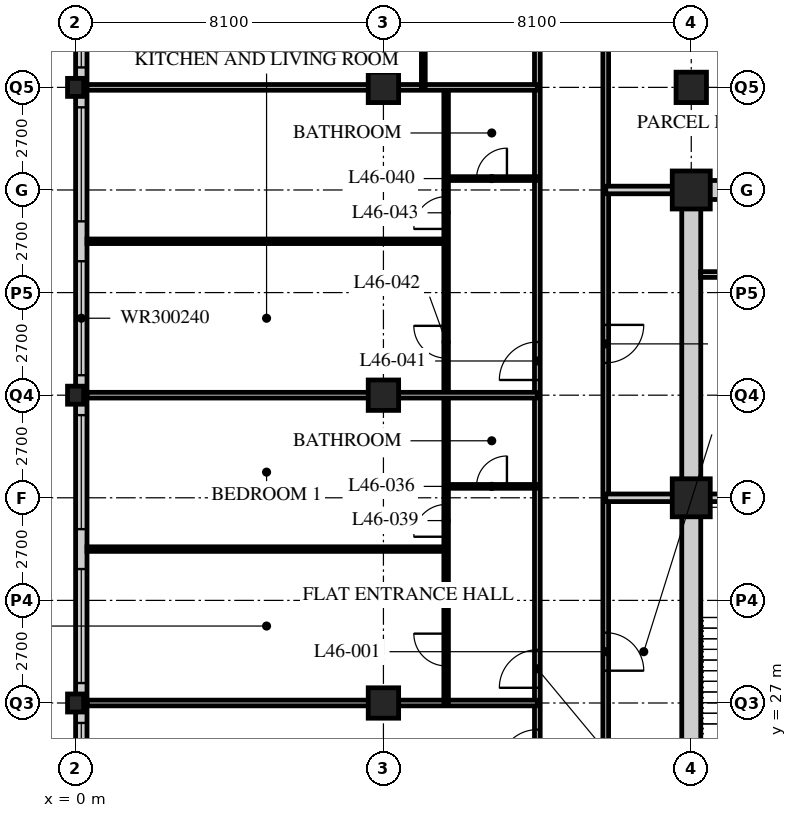
"""IFC4 building model, lengths in metres.
Left out: names, types, materials, properties, quantities, classifications, styles, units other than length and angle.
Written with IfcOpenShell. Run it as: python <this file> out.ifc"""

import sys

from ifc_helpers import new_model, si_unit, direction, frame, frame_2d, origin, origin_2d, place, context, subcontext, project, spatial, rectangle, hollow_rectangle, i_section, extrude, element, fill, save


model = new_model("IFC4")
c1 = context("Model", 3, precision=1e-05, world=origin(), true_north=direction((0.0, 1.0)))
c2 = subcontext(c1, "Body", "Model", "MODEL_VIEW")
j1 = project(units=[si_unit("LENGTHUNIT", "METRE"), si_unit("PLANEANGLEUNIT", "RADIAN")], contexts=[c1])
p1 = place(None, origin())
s1 = spatial("IfcSite", under=j1, at=p1, CompositionType="ELEMENT")
p2 = place(p1, origin())
s2 = spatial("IfcBuilding", under=s1, at=p2, CompositionType="ELEMENT")
p3 = place(p2, frame((0.0, 0.0, 181.2)))
s3 = spatial("IfcBuildingStorey", under=s2, at=p3, CompositionType="ELEMENT", Elevation=181.2)
for number, where, z_axis, x_axis in (
    (1, (0.0, 27.0, 0.0), (0.0, 0.0, 1.0), (1.0, 0.0, 0.0)),
    (2, (0.0, 35.1, 0.0), (0.0, 0.0, 1.0), (1.0, 0.0, 0.0)),
    (3, (0.0, 43.2, 0.0), (0.0, 0.0, 1.0), (1.0, 0.0, 0.0)),
):
    element("IfcColumn", number, at=place(p3, frame(where, z_axis=z_axis, x_axis=x_axis)), inside=s3, PredefinedType="COLUMN", context=c2, shape_type="SweptSolid", body=[
        extrude(i_section(OverallWidth=0.424, OverallDepth=0.475, WebThickness=0.048, FlangeThickness=0.077, FilletRadius=0.015, at=origin_2d()), origin(), (0.0, 0.0, 1.0), 3.6),
    ])
for number, where, z_axis, x_axis in (
    (4, (8.1, 27.0, 0.0), (0.0, 0.0, 1.0), (1.0, 0.0, 0.0)),
    (5, (8.1, 35.1, 0.0), (0.0, 0.0, 1.0), (1.0, 0.0, 0.0)),
    (6, (8.1, 43.2, 0.0), (0.0, 0.0, 1.0), (1.0, 0.0, 0.0)),
):
    element("IfcColumn", number, at=place(p3, frame(where, z_axis=z_axis, x_axis=x_axis)), inside=s3, PredefinedType="COLUMN", context=c2, shape_type="SweptSolid", body=[
        extrude(hollow_rectangle(XDim=0.8, YDim=0.8, WallThickness=0.08, at=origin_2d()), origin(), (0.0, 0.0, 1.0), 3.6),
    ])
for number, where, z_axis, x_axis in (
    (7, (16.2, 32.4, 0.0), (0.0, 0.0, 1.0), (1.0, 0.0, 0.0)),
    (8, (16.2, 40.5, 0.0), (0.0, 0.0, 1.0), (1.0, 0.0, 0.0)),
):
    element("IfcColumn", number, at=place(p3, frame(where, z_axis=z_axis, x_axis=x_axis)), inside=s3, PredefinedType="COLUMN", context=c2, shape_type="SweptSolid", body=[
        extrude(hollow_rectangle(XDim=1.0, YDim=1.0, WallThickness=0.1, at=origin_2d()), origin(), (0.0, 0.0, 1.0), 3.6),
    ])
p4 = place(p3, frame((16.2, 43.2, 0.0), z_axis=(0.0, 0.0, 1.0), x_axis=(1.0, 0.0, 0.0)))
e9 = element("IfcColumn", 9, at=p4, inside=s3, PredefinedType="COLUMN", context=c2, shape_type="SweptSolid", body=[
    extrude(hollow_rectangle(XDim=0.8, YDim=0.8, WallThickness=0.08, at=origin_2d()), origin(), (0.0, 0.0, 1.0), 3.6),
])
p5 = place(p3, frame((0.15, 51.0, 0.0), z_axis=(0.0, 0.0, 1.0), x_axis=(0.0, -1.0, 0.0)))
e10 = element("IfcWall", 10, at=p5, inside=s3, PredefinedType="SOLIDWALL", context=c2, shape_type="SweptSolid", body=[
    extrude(rectangle(XDim=32.1, YDim=0.3, at=frame_2d((16.05, 0.0))), origin(), (0.0, 0.0, 1.0), 3.39),
])
p6 = place(p5, frame((0.225, 0.0, 0.6)))
e11 = element("IfcOpeningElement", 11, at=p6, cuts=e10, PredefinedType="OPENING", context=c2, shape_type="SweptSolid", body=[
    extrude(rectangle(XDim=3.0, YDim=2.4, at=frame_2d((1.5, 1.2))), frame((0.0, 0.16, 0.0), z_axis=(0.0, -1.0, 0.0), x_axis=(1.0, 0.0, 0.0)), (0.0, 0.0, 1.0), 0.32),
])
p7 = place(p5, frame((4.275, 0.0, 0.6)))
e12 = element("IfcOpeningElement", 12, at=p7, cuts=e10, PredefinedType="OPENING", context=c2, shape_type="SweptSolid", body=[
    extrude(rectangle(XDim=3.0, YDim=2.4, at=frame_2d((1.5, 1.2))), frame((0.0, 0.16, 0.0), z_axis=(0.0, -1.0, 0.0), x_axis=(1.0, 0.0, 0.0)), (0.0, 0.0, 1.0), 0.32),
])
p8 = place(p5, frame((8.325, 0.0, 0.6)))
e13 = element("IfcOpeningElement", 13, at=p8, cuts=e10, PredefinedType="OPENING", context=c2, shape_type="SweptSolid", body=[
    extrude(rectangle(XDim=3.0, YDim=2.4, at=frame_2d((1.5, 1.2))), frame((0.0, 0.16, 0.0), z_axis=(0.0, -1.0, 0.0), x_axis=(1.0, 0.0, 0.0)), (0.0, 0.0, 1.0), 0.32),
])
p9 = place(p5, frame((12.375, 0.0, 0.6)))
e14 = element("IfcOpeningElement", 14, at=p9, cuts=e10, PredefinedType="OPENING", context=c2, shape_type="SweptSolid", body=[
    extrude(rectangle(XDim=3.0, YDim=2.4, at=frame_2d((1.5, 1.2))), frame((0.0, 0.16, 0.0), z_axis=(0.0, -1.0, 0.0), x_axis=(1.0, 0.0, 0.0)), (0.0, 0.0, 1.0), 0.32),
])
p10 = place(p5, frame((16.425, 0.0, 0.6)))
e15 = element("IfcOpeningElement", 15, at=p10, cuts=e10, PredefinedType="OPENING", context=c2, shape_type="SweptSolid", body=[
    extrude(rectangle(XDim=3.0, YDim=2.4, at=frame_2d((1.5, 1.2))), frame((0.0, 0.16, 0.0), z_axis=(0.0, -1.0, 0.0), x_axis=(1.0, 0.0, 0.0)), (0.0, 0.0, 1.0), 0.32),
])
p11 = place(p5, frame((20.475, 0.0, 0.6)))
e16 = element("IfcOpeningElement", 16, at=p11, cuts=e10, PredefinedType="OPENING", context=c2, shape_type="SweptSolid", body=[
    extrude(rectangle(XDim=3.0, YDim=2.4, at=frame_2d((1.5, 1.2))), frame((0.0, 0.16, 0.0), z_axis=(0.0, -1.0, 0.0), x_axis=(1.0, 0.0, 0.0)), (0.0, 0.0, 1.0), 0.32),
])
p12 = place(p5, frame((24.525, 0.0, 0.6)))
e17 = element("IfcOpeningElement", 17, at=p12, cuts=e10, PredefinedType="OPENING", context=c2, shape_type="SweptSolid", body=[
    extrude(rectangle(XDim=3.0, YDim=2.4, at=frame_2d((1.5, 1.2))), frame((0.0, 0.16, 0.0), z_axis=(0.0, -1.0, 0.0), x_axis=(1.0, 0.0, 0.0)), (0.0, 0.0, 1.0), 0.32),
])
p13 = place(p5, frame((28.575, 0.0, 0.6)))
e18 = element("IfcOpeningElement", 18, at=p13, cuts=e10, PredefinedType="OPENING", context=c2, shape_type="SweptSolid", body=[
    extrude(rectangle(XDim=3.0, YDim=2.4, at=frame_2d((1.5, 1.2))), frame((0.0, 0.16, 0.0), z_axis=(0.0, -1.0, 0.0), x_axis=(1.0, 0.0, 0.0)), (0.0, 0.0, 1.0), 0.32),
])
p14 = place(p3, frame((12.15, 18.9, 0.0), z_axis=(0.0, 0.0, 1.0), x_axis=(0.0, 1.0, 0.0)))
e19 = element("IfcWall", 19, at=p14, inside=s3, PredefinedType="PARTITIONING", context=c2, shape_type="SweptSolid", body=[
    extrude(rectangle(XDim=28.35, YDim=0.15, at=frame_2d((14.175, 0.0))), origin(), (0.0, 0.0, 1.0), 3.39),
])
p15 = place(p14, frame((2.35, 0.0, 0.0)))
e20 = element("IfcOpeningElement", 20, at=p15, cuts=e19, PredefinedType="OPENING", context=c2, shape_type="SweptSolid", body=[
    extrude(rectangle(XDim=1.0, YDim=2.1, at=frame_2d((0.5, 1.05))), frame((0.0, 0.085, 0.0), z_axis=(0.0, -1.0, 0.0), x_axis=(1.0, 0.0, 0.0)), (0.0, 0.0, 1.0), 0.17),
])
p16 = place(p14, frame((6.4, 0.0, 0.0)))
e21 = element("IfcOpeningElement", 21, at=p16, cuts=e19, PredefinedType="OPENING", context=c2, shape_type="SweptSolid", body=[
    extrude(rectangle(XDim=1.0, YDim=2.1, at=frame_2d((0.5, 1.05))), frame((0.0, 0.085, 0.0), z_axis=(0.0, -1.0, 0.0), x_axis=(1.0, 0.0, 0.0)), (0.0, 0.0, 1.0), 0.17),
])
p17 = place(p14, frame((8.5, 0.0, 0.0)))
e22 = element("IfcOpeningElement", 22, at=p17, cuts=e19, PredefinedType="OPENING", context=c2, shape_type="SweptSolid", body=[
    extrude(rectangle(XDim=1.0, YDim=2.1, at=frame_2d((0.5, 1.05))), frame((0.0, 0.085, 0.0), z_axis=(0.0, -1.0, 0.0), x_axis=(1.0, 0.0, 0.0)), (0.0, 0.0, 1.0), 0.17),
])
p18 = place(p14, frame((16.6, 0.0, 0.0)))
e23 = element("IfcOpeningElement", 23, at=p18, cuts=e19, PredefinedType="OPENING", context=c2, shape_type="SweptSolid", body=[
    extrude(rectangle(XDim=1.0, YDim=2.1, at=frame_2d((0.5, 1.05))), frame((0.0, 0.085, 0.0), z_axis=(0.0, -1.0, 0.0), x_axis=(1.0, 0.0, 0.0)), (0.0, 0.0, 1.0), 0.17),
])
p19 = place(p14, frame((26.65, 0.0, 0.0)))
e24 = element("IfcOpeningElement", 24, at=p19, cuts=e19, PredefinedType="OPENING", context=c2, shape_type="SweptSolid", body=[
    extrude(rectangle(XDim=1.0, YDim=2.1, at=frame_2d((0.5, 1.05))), frame((0.0, 0.085, 0.0), z_axis=(0.0, -1.0, 0.0), x_axis=(1.0, 0.0, 0.0)), (0.0, 0.0, 1.0), 0.17),
])
p20 = place(p3, frame((13.95, 45.45, 0.0), z_axis=(0.0, 0.0, 1.0), x_axis=(0.0, -1.0, 0.0)))
e25 = element("IfcWall", 25, at=p20, inside=s3, PredefinedType="PARTITIONING", context=c2, shape_type="SweptSolid", body=[
    extrude(rectangle(XDim=24.75, YDim=0.15, at=frame_2d((12.375, 0.0))), origin(), (0.0, 0.0, 1.0), 3.39),
])
p21 = place(p20, frame((16.6, 0.0, 0.0)))
e26 = element("IfcOpeningElement", 26, at=p21, cuts=e25, PredefinedType="OPENING", context=c2, shape_type="SweptSolid", body=[
    extrude(rectangle(XDim=1.0, YDim=2.1, at=frame_2d((0.5, 1.05))), frame((0.0, 0.085, 0.0), z_axis=(0.0, -1.0, 0.0), x_axis=(1.0, 0.0, 0.0)), (0.0, 0.0, 1.0), 0.17),
])
p22 = place(p20, frame((8.5, 0.0, 0.0)))
e27 = element("IfcOpeningElement", 27, at=p22, cuts=e25, PredefinedType="OPENING", context=c2, shape_type="SweptSolid", body=[
    extrude(rectangle(XDim=1.0, YDim=2.1, at=frame_2d((0.5, 1.05))), frame((0.0, 0.085, 0.0), z_axis=(0.0, -1.0, 0.0), x_axis=(1.0, 0.0, 0.0)), (0.0, 0.0, 1.0), 0.17),
])
for number, where, z_axis, x_axis in (
    (28, (13.95, 32.4, 0.0), (0.0, 0.0, 1.0), (1.0, 0.0, 0.0)),
    (29, (13.95, 40.5, 0.0), (0.0, 0.0, 1.0), (1.0, 0.0, 0.0)),
):
    element("IfcWall", number, at=place(p3, frame(where, z_axis=z_axis, x_axis=x_axis)), inside=s3, PredefinedType="SOLIDWALL", context=c2, shape_type="SweptSolid", body=[
        extrude(rectangle(XDim=2.25, YDim=0.2, at=frame_2d((1.125, 0.0))), origin(), (0.0, 0.0, 1.0), 3.39),
    ])
p23 = place(p3, frame((12.15, 27.0, 0.0), z_axis=(0.0, 0.0, 1.0), x_axis=(-1.0, 0.0, 0.0)))
e30 = element("IfcWall", 30, at=p23, inside=s3, PredefinedType="PARTITIONING", context=c2, shape_type="SweptSolid", body=[
    extrude(rectangle(XDim=11.85, YDim=0.15, at=frame_2d((5.925, 0.0))), origin(), (0.0, 0.0, 1.0), 2.778),
])
p24 = place(p3, frame((9.75, 27.0, 0.0), z_axis=(0.0, 0.0, 1.0), x_axis=(0.0, 1.0, 0.0)))
e31 = element("IfcWall", 31, at=p24, inside=s3, PredefinedType="PARTITIONING", context=c2, shape_type="SweptSolid", body=[
    extrude(rectangle(XDim=16.2, YDim=0.12, at=frame_2d((8.1, 0.0))), origin(), (0.0, 0.0, 1.0), 3.39),
])
p25 = place(p24, frame((0.975, 0.0, 0.0)))
e32 = element("IfcOpeningElement", 32, at=p25, cuts=e31, PredefinedType="OPENING", context=c2, shape_type="SweptSolid", body=[
    extrude(rectangle(XDim=0.85, YDim=2.1, at=frame_2d((0.425, 1.05))), frame((0.0, 0.07, 0.0), z_axis=(0.0, -1.0, 0.0), x_axis=(1.0, 0.0, 0.0)), (0.0, 0.0, 1.0), 0.14),
])
p26 = place(p24, frame((4.375, 0.0, 0.0)))
e33 = element("IfcOpeningElement", 33, at=p26, cuts=e31, PredefinedType="OPENING", context=c2, shape_type="SweptSolid", body=[
    extrude(rectangle(XDim=0.85, YDim=2.1, at=frame_2d((0.425, 1.05))), frame((0.0, 0.07, 0.0), z_axis=(0.0, -1.0, 0.0), x_axis=(1.0, 0.0, 0.0)), (0.0, 0.0, 1.0), 0.14),
])
p27 = place(p24, frame((9.075, 0.0, 0.0)))
e34 = element("IfcOpeningElement", 34, at=p27, cuts=e31, PredefinedType="OPENING", context=c2, shape_type="SweptSolid", body=[
    extrude(rectangle(XDim=0.85, YDim=2.1, at=frame_2d((0.425, 1.05))), frame((0.0, 0.07, 0.0), z_axis=(0.0, -1.0, 0.0), x_axis=(1.0, 0.0, 0.0)), (0.0, 0.0, 1.0), 0.14),
])
p28 = place(p24, frame((12.475, 0.0, 0.0)))
e35 = element("IfcOpeningElement", 35, at=p28, cuts=e31, PredefinedType="OPENING", context=c2, shape_type="SweptSolid", body=[
    extrude(rectangle(XDim=0.85, YDim=2.1, at=frame_2d((0.425, 1.05))), frame((0.0, 0.07, 0.0), z_axis=(0.0, -1.0, 0.0), x_axis=(1.0, 0.0, 0.0)), (0.0, 0.0, 1.0), 0.14),
])
p29 = place(p3, frame((12.15, 32.7, 0.0), z_axis=(0.0, 0.0, 1.0), x_axis=(-1.0, 0.0, 0.0)))
e36 = element("IfcWall", 36, at=p29, inside=s3, PredefinedType="PARTITIONING", context=c2, shape_type="SweptSolid", body=[
    extrude(rectangle(XDim=2.4, YDim=0.1, at=frame_2d((1.2, 0.0))), origin(), (0.0, 0.0, 1.0), 3.39),
])
p30 = place(p29, frame((0.8, 0.0, 0.0)))
e37 = element("IfcOpeningElement", 37, at=p30, cuts=e36, PredefinedType="OPENING", context=c2, shape_type="SweptSolid", body=[
    extrude(rectangle(XDim=0.8, YDim=2.1, at=frame_2d((0.4, 1.05))), frame((0.0, 0.06, 0.0), z_axis=(0.0, -1.0, 0.0), x_axis=(1.0, 0.0, 0.0)), (0.0, 0.0, 1.0), 0.12),
])
p31 = place(p3, frame((9.75, 31.05, 0.0), z_axis=(0.0, 0.0, 1.0), x_axis=(-1.0, 0.0, 0.0)))
e38 = element("IfcWall", 38, at=p31, inside=s3, PredefinedType="PARTITIONING", context=c2, shape_type="SweptSolid", body=[
    extrude(rectangle(XDim=9.45, YDim=0.12, at=frame_2d((4.725, 0.0))), origin(), (0.0, 0.0, 1.0), 3.39),
])
p32 = place(p3, frame((12.15, 35.1, 0.0), z_axis=(0.0, 0.0, 1.0), x_axis=(-1.0, 0.0, 0.0)))
e39 = element("IfcWall", 39, at=p32, inside=s3, PredefinedType="PARTITIONING", context=c2, shape_type="SweptSolid", body=[
    extrude(rectangle(XDim=11.85, YDim=0.15, at=frame_2d((5.925, 0.0))), origin(), (0.0, 0.0, 1.0), 2.778),
])
p33 = place(p3, frame((12.15, 40.8, 0.0), z_axis=(0.0, 0.0, 1.0), x_axis=(-1.0, 0.0, 0.0)))
e40 = element("IfcWall", 40, at=p33, inside=s3, PredefinedType="PARTITIONING", context=c2, shape_type="SweptSolid", body=[
    extrude(rectangle(XDim=2.4, YDim=0.1, at=frame_2d((1.2, 0.0))), origin(), (0.0, 0.0, 1.0), 3.39),
])
p34 = place(p33, frame((0.8, 0.0, 0.0)))
e41 = element("IfcOpeningElement", 41, at=p34, cuts=e40, PredefinedType="OPENING", context=c2, shape_type="SweptSolid", body=[
    extrude(rectangle(XDim=0.8, YDim=2.1, at=frame_2d((0.4, 1.05))), frame((0.0, 0.06, 0.0), z_axis=(0.0, -1.0, 0.0), x_axis=(1.0, 0.0, 0.0)), (0.0, 0.0, 1.0), 0.12),
])
p35 = place(p3, frame((9.75, 39.15, 0.0), z_axis=(0.0, 0.0, 1.0), x_axis=(-1.0, 0.0, 0.0)))
e42 = element("IfcWall", 42, at=p35, inside=s3, PredefinedType="PARTITIONING", context=c2, shape_type="SweptSolid", body=[
    extrude(rectangle(XDim=9.45, YDim=0.12, at=frame_2d((4.725, 0.0))), origin(), (0.0, 0.0, 1.0), 3.39),
])
p36 = place(p3, frame((12.15, 43.2, 0.0), z_axis=(0.0, 0.0, 1.0), x_axis=(-1.0, 0.0, 0.0)))
e43 = element("IfcWall", 43, at=p36, inside=s3, PredefinedType="PARTITIONING", context=c2, shape_type="SweptSolid", body=[
    extrude(rectangle(XDim=11.85, YDim=0.15, at=frame_2d((5.925, 0.0))), origin(), (0.0, 0.0, 1.0), 2.778),
])
p37 = place(p3, frame((9.15, 43.2, 0.0), z_axis=(0.0, 0.0, 1.0), x_axis=(0.0, 1.0, 0.0)))
e44 = element("IfcWall", 44, at=p37, inside=s3, PredefinedType="PARTITIONING", context=c2, shape_type="SweptSolid", body=[
    extrude(rectangle(XDim=2.2, YDim=0.1, at=frame_2d((1.1, 0.0))), origin(), (0.0, 0.0, 1.0), 3.39),
])
p38 = place(p3, frame((15.95, 40.5, 0.0), z_axis=(0.0, 0.0, 1.0), x_axis=(1.0, 0.0, 0.0)))
e45 = element("IfcWall", 45, at=p38, inside=s3, PredefinedType="SOLIDWALL", context=c2, shape_type="SweptSolid", body=[
    extrude(rectangle(XDim=24.8, YDim=0.5, at=frame_2d((12.4, 0.0))), origin(), (0.0, 0.0, 1.0), 2.74),
])
p39 = place(p38, frame((11.5, 0.0, 0.0)))
e46 = element("IfcOpeningElement", 46, at=p39, cuts=e45, PredefinedType="OPENING", context=c2, shape_type="SweptSolid", body=[
    extrude(rectangle(XDim=1.8, YDim=2.4, at=frame_2d((0.9, 1.2))), frame((0.0, 0.26, 0.0), z_axis=(0.0, -1.0, 0.0), x_axis=(1.0, 0.0, 0.0)), (0.0, 0.0, 1.0), 0.52),
])
p40 = place(p3, frame((16.2, 24.55, 0.0), z_axis=(0.0, 0.0, 1.0), x_axis=(0.0, 1.0, 0.0)))
e47 = element("IfcWall", 47, at=p40, inside=s3, PredefinedType="SOLIDWALL", context=c2, shape_type="SweptSolid", body=[
    extrude(rectangle(XDim=15.7, YDim=0.5, at=frame_2d((7.85, 0.0))), origin(), (0.0, 0.0, 1.0), 2.778),
])
p41 = place(p3, frame((16.45, 32.4, 0.0), z_axis=(0.0, 0.0, 1.0), x_axis=(1.0, 0.0, 0.0)))
e48 = element("IfcWall", 48, at=p41, inside=s3, PredefinedType="SOLIDWALL", context=c2, shape_type="SweptSolid", body=[
    extrude(rectangle(XDim=7.95, YDim=0.2, at=frame_2d((3.975, 0.0))), origin(), (0.0, 0.0, 1.0), 2.778),
])
p42 = place(p3, frame((16.45, 38.275, 0.0), z_axis=(0.0, 0.0, 1.0), x_axis=(1.0, 0.0, 0.0)))
e49 = element("IfcWall", 49, at=p42, inside=s3, PredefinedType="PARTITIONING", context=c2, shape_type="SweptSolid", body=[
    extrude(rectangle(XDim=7.75, YDim=0.15, at=frame_2d((3.875, 0.0))), origin(), (0.0, 0.0, 1.0), 3.39),
])
p43 = place(p7, origin())
e50 = element("IfcWindow", 50, at=p43, inside=s3, PartitioningType="SINGLE_PANEL", PredefinedType="WINDOW", context=c2, shape_type="SweptSolid", body=[
    extrude(rectangle(XDim=3.0, YDim=2.4, at=frame_2d((1.5, 1.2))), frame((0.0, 0.03, 0.0), z_axis=(0.0, -1.0, 0.0), x_axis=(1.0, 0.0, 0.0)), (0.0, 0.0, 1.0), 0.06),
])
fill(e12, e50)
p44 = place(p8, origin())
e51 = element("IfcWindow", 51, at=p44, inside=s3, PartitioningType="SINGLE_PANEL", PredefinedType="WINDOW", context=c2, shape_type="SweptSolid", body=[
    extrude(rectangle(XDim=3.0, YDim=2.4, at=frame_2d((1.5, 1.2))), frame((0.0, 0.03, 0.0), z_axis=(0.0, -1.0, 0.0), x_axis=(1.0, 0.0, 0.0)), (0.0, 0.0, 1.0), 0.06),
])
fill(e13, e51)
p45 = place(p9, origin())
e52 = element("IfcWindow", 52, at=p45, inside=s3, PartitioningType="SINGLE_PANEL", PredefinedType="WINDOW", context=c2, shape_type="SweptSolid", body=[
    extrude(rectangle(XDim=3.0, YDim=2.4, at=frame_2d((1.5, 1.2))), frame((0.0, 0.03, 0.0), z_axis=(0.0, -1.0, 0.0), x_axis=(1.0, 0.0, 0.0)), (0.0, 0.0, 1.0), 0.06),
])
fill(e14, e52)
p46 = place(p10, origin())
e53 = element("IfcWindow", 53, at=p46, inside=s3, PartitioningType="SINGLE_PANEL", PredefinedType="WINDOW", context=c2, shape_type="SweptSolid", body=[
    extrude(rectangle(XDim=3.0, YDim=2.4, at=frame_2d((1.5, 1.2))), frame((0.0, 0.03, 0.0), z_axis=(0.0, -1.0, 0.0), x_axis=(1.0, 0.0, 0.0)), (0.0, 0.0, 1.0), 0.06),
])
fill(e15, e53)
p47 = place(p11, origin())
e54 = element("IfcWindow", 54, at=p47, inside=s3, PartitioningType="SINGLE_PANEL", PredefinedType="WINDOW", context=c2, shape_type="SweptSolid", body=[
    extrude(rectangle(XDim=3.0, YDim=2.4, at=frame_2d((1.5, 1.2))), frame((0.0, 0.03, 0.0), z_axis=(0.0, -1.0, 0.0), x_axis=(1.0, 0.0, 0.0)), (0.0, 0.0, 1.0), 0.06),
])
fill(e16, e54)
p48 = place(p12, origin())
e55 = element("IfcWindow", 55, at=p48, inside=s3, PartitioningType="SINGLE_PANEL", PredefinedType="WINDOW", context=c2, shape_type="SweptSolid", body=[
    extrude(rectangle(XDim=3.0, YDim=2.4, at=frame_2d((1.5, 1.2))), frame((0.0, 0.03, 0.0), z_axis=(0.0, -1.0, 0.0), x_axis=(1.0, 0.0, 0.0)), (0.0, 0.0, 1.0), 0.06),
])
fill(e17, e55)
p49 = place(p21, origin())
e56 = element("IfcDoor", 56, at=p49, inside=s3, OperationType="SINGLE_SWING_RIGHT", PredefinedType="DOOR", context=c2, shape_type="SweptSolid", body=[
    extrude(rectangle(XDim=1.0, YDim=2.1, at=frame_2d((0.5, 1.05))), frame((0.0, 0.025, 0.0), z_axis=(0.0, -1.0, 0.0), x_axis=(1.0, 0.0, 0.0)), (0.0, 0.0, 1.0), 0.05),
])
fill(e26, e56)
p50 = place(p22, origin())
e57 = element("IfcDoor", 57, at=p50, inside=s3, OperationType="SINGLE_SWING_LEFT", PredefinedType="DOOR", context=c2, shape_type="SweptSolid", body=[
    extrude(rectangle(XDim=1.0, YDim=2.1, at=frame_2d((0.5, 1.05))), frame((0.0, 0.025, 0.0), z_axis=(0.0, -1.0, 0.0), x_axis=(1.0, 0.0, 0.0)), (0.0, 0.0, 1.0), 0.05),
])
fill(e27, e57)
p51 = place(p16, origin())
e58 = element("IfcDoor", 58, at=p51, inside=s3, OperationType="SINGLE_SWING_LEFT", PredefinedType="DOOR", context=c2, shape_type="SweptSolid", body=[
    extrude(rectangle(XDim=1.0, YDim=2.1, at=frame_2d((0.5, 1.05))), frame((0.0, 0.025, 0.0), z_axis=(0.0, -1.0, 0.0), x_axis=(1.0, 0.0, 0.0)), (0.0, 0.0, 1.0), 0.05),
])
fill(e21, e58)
p52 = place(p30, origin())
e59 = element("IfcDoor", 59, at=p52, inside=s3, OperationType="SINGLE_SWING_RIGHT", PredefinedType="DOOR", context=c2, shape_type="SweptSolid", body=[
    extrude(rectangle(XDim=0.8, YDim=2.1, at=frame_2d((0.4, 1.05))), frame((0.0, 0.025, 0.0), z_axis=(0.0, -1.0, 0.0), x_axis=(1.0, 0.0, 0.0)), (0.0, 0.0, 1.0), 0.05),
])
fill(e37, e59)
p53 = place(p17, origin())
e60 = element("IfcDoor", 60, at=p53, inside=s3, OperationType="SINGLE_SWING_LEFT", PredefinedType="DOOR", context=c2, shape_type="SweptSolid", body=[
    extrude(rectangle(XDim=1.0, YDim=2.1, at=frame_2d((0.5, 1.05))), frame((0.0, 0.025, 0.0), z_axis=(0.0, -1.0, 0.0), x_axis=(1.0, 0.0, 0.0)), (0.0, 0.0, 1.0), 0.05),
])
fill(e22, e60)
p54 = place(p25, origin())
e61 = element("IfcDoor", 61, at=p54, inside=s3, OperationType="SINGLE_SWING_RIGHT", PredefinedType="DOOR", context=c2, shape_type="SweptSolid", body=[
    extrude(rectangle(XDim=0.85, YDim=2.1, at=frame_2d((0.425, 1.05))), frame((0.0, 0.025, 0.0), z_axis=(0.0, -1.0, 0.0), x_axis=(1.0, 0.0, 0.0)), (0.0, 0.0, 1.0), 0.05),
])
fill(e32, e61)
p55 = place(p26, origin())
e62 = element("IfcDoor", 62, at=p55, inside=s3, OperationType="SINGLE_SWING_LEFT", PredefinedType="DOOR", context=c2, shape_type="SweptSolid", body=[
    extrude(rectangle(XDim=0.85, YDim=2.1, at=frame_2d((0.425, 1.05))), frame((0.0, 0.025, 0.0), z_axis=(0.0, -1.0, 0.0), x_axis=(1.0, 0.0, 0.0)), (0.0, 0.0, 1.0), 0.05),
])
fill(e33, e62)
p56 = place(p34, origin())
e63 = element("IfcDoor", 63, at=p56, inside=s3, OperationType="SINGLE_SWING_RIGHT", PredefinedType="DOOR", context=c2, shape_type="SweptSolid", body=[
    extrude(rectangle(XDim=0.8, YDim=2.1, at=frame_2d((0.4, 1.05))), frame((0.0, 0.025, 0.0), z_axis=(0.0, -1.0, 0.0), x_axis=(1.0, 0.0, 0.0)), (0.0, 0.0, 1.0), 0.05),
])
fill(e41, e63)
p57 = place(p18, origin())
e64 = element("IfcDoor", 64, at=p57, inside=s3, OperationType="SINGLE_SWING_LEFT", PredefinedType="DOOR", context=c2, shape_type="SweptSolid", body=[
    extrude(rectangle(XDim=1.0, YDim=2.1, at=frame_2d((0.5, 1.05))), frame((0.0, 0.025, 0.0), z_axis=(0.0, -1.0, 0.0), x_axis=(1.0, 0.0, 0.0)), (0.0, 0.0, 1.0), 0.05),
])
fill(e23, e64)
p58 = place(p27, origin())
e65 = element("IfcDoor", 65, at=p58, inside=s3, OperationType="SINGLE_SWING_RIGHT", PredefinedType="DOOR", context=c2, shape_type="SweptSolid", body=[
    extrude(rectangle(XDim=0.85, YDim=2.1, at=frame_2d((0.425, 1.05))), frame((0.0, 0.025, 0.0), z_axis=(0.0, -1.0, 0.0), x_axis=(1.0, 0.0, 0.0)), (0.0, 0.0, 1.0), 0.05),
])
fill(e34, e65)
p59 = place(p28, origin())
e66 = element("IfcDoor", 66, at=p59, inside=s3, OperationType="SINGLE_SWING_LEFT", PredefinedType="DOOR", context=c2, shape_type="SweptSolid", body=[
    extrude(rectangle(XDim=0.85, YDim=2.1, at=frame_2d((0.425, 1.05))), frame((0.0, 0.025, 0.0), z_axis=(0.0, -1.0, 0.0), x_axis=(1.0, 0.0, 0.0)), (0.0, 0.0, 1.0), 0.05),
])
fill(e35, e66)
save(model, sys.argv[1])
